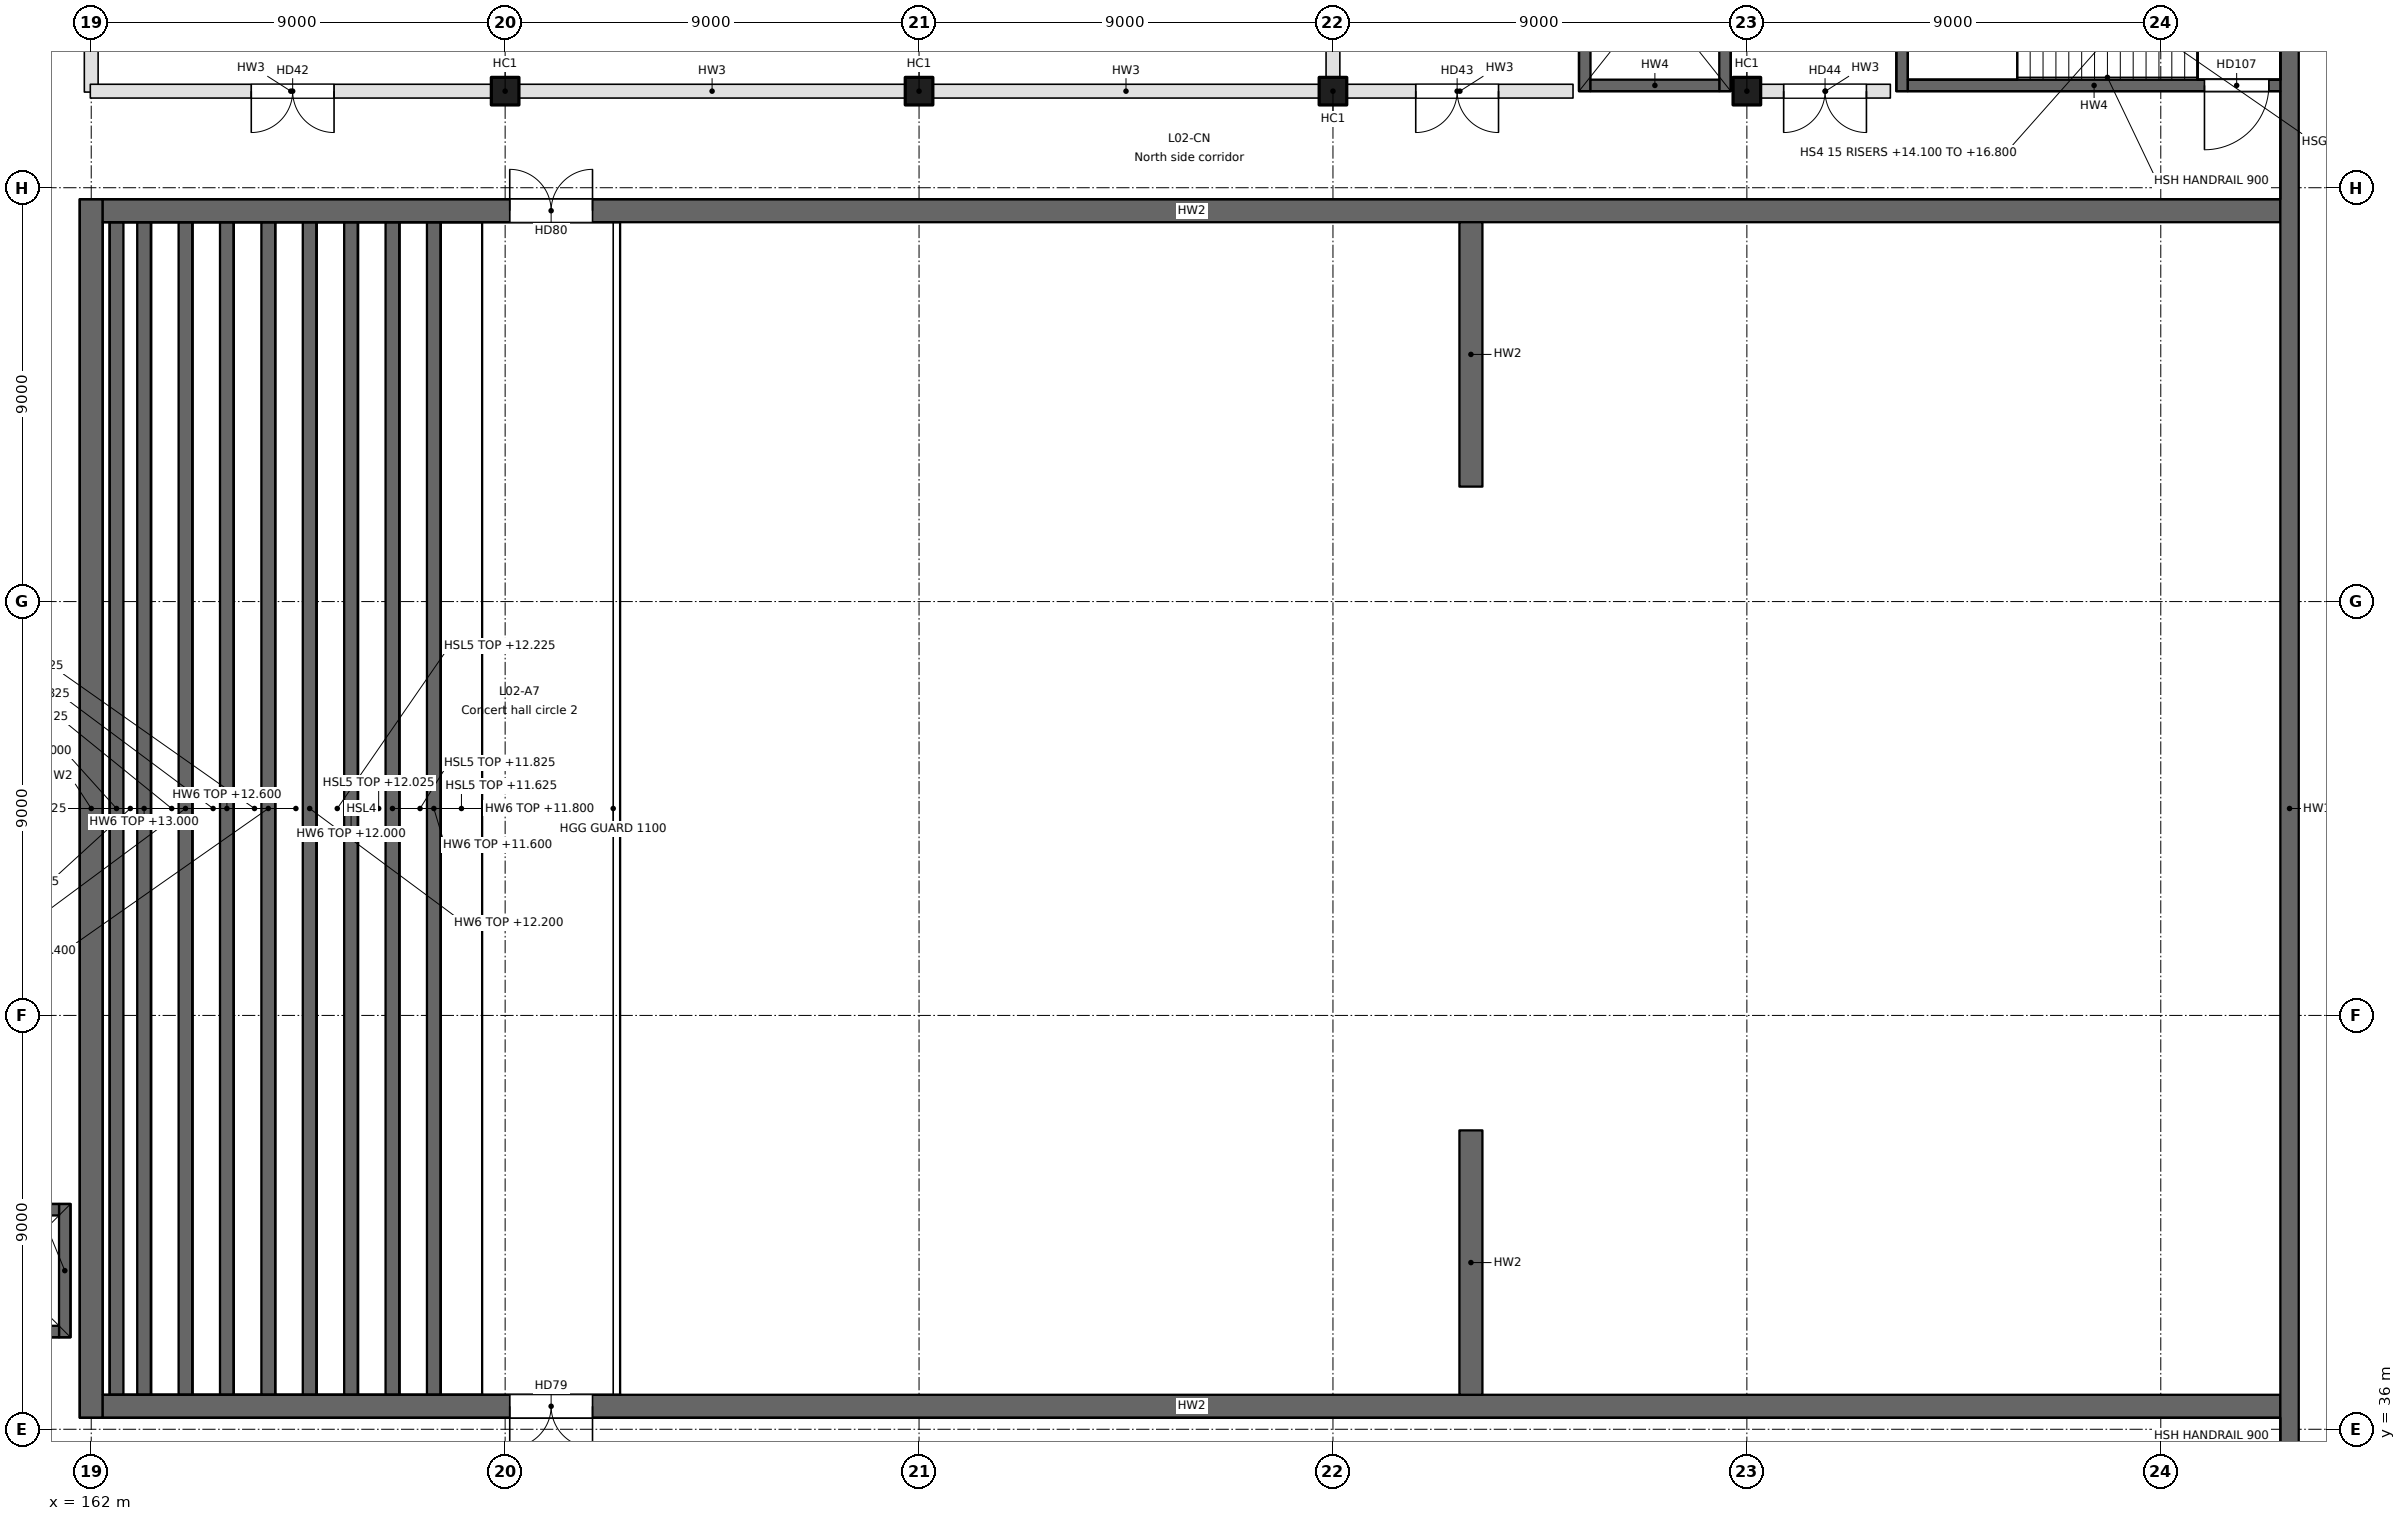
"""IFC4 building model, lengths in metres.
Left out: names, types, materials, properties, quantities, classifications, styles, units other than length and angle.
Written with IfcOpenShell. Run it as: python <this file> out.ifc"""

import sys

from ifc_helpers import new_model, si_unit, direction, frame, frame_2d, origin, origin_2d, place, context, subcontext, project, spatial, rectangle, extrude, element, fill, save


model = new_model("IFC4")
c1 = context("Model", 3, precision=1e-05, world=origin(), true_north=direction((0.0, 1.0)))
c2 = subcontext(c1, "Body", "Model", "MODEL_VIEW")
j1 = project(units=[si_unit("LENGTHUNIT", "METRE"), si_unit("PLANEANGLEUNIT", "RADIAN")], contexts=[c1])
p1 = place(None, origin())
s1 = spatial("IfcSite", under=j1, at=p1, CompositionType="ELEMENT")
p2 = place(p1, origin())
s2 = spatial("IfcBuilding", under=s1, at=p2, CompositionType="ELEMENT")
p3 = place(p2, frame((0.0, 0.0, 11.4)))
s3 = spatial("IfcBuildingStorey", under=s2, at=p3, CompositionType="ELEMENT", Elevation=11.4)
for number, where, z_axis, x_axis in (
    (1, (171.0, 65.1, 0.0), (0.0, 0.0, 1.0), (1.0, 0.0, 0.0)),
    (2, (180.0, 65.1, 0.0), (0.0, 0.0, 1.0), (1.0, 0.0, 0.0)),
    (3, (189.0, 65.1, 0.0), (0.0, 0.0, 1.0), (1.0, 0.0, 0.0)),
    (4, (198.0, 65.1, 0.0), (0.0, 0.0, 1.0), (1.0, 0.0, 0.0)),
):
    element("IfcColumn", number, at=place(p3, frame(where, z_axis=z_axis, x_axis=x_axis)), inside=s3, PredefinedType="COLUMN", context=c2, shape_type="SweptSolid", body=[
        extrude(rectangle(XDim=0.6, YDim=0.6, at=origin_2d()), origin(), (0.0, 0.0, 1.0), 5.4),
    ])
p4 = place(p3, frame((162.0, 36.25, -0.35), z_axis=(0.0, 0.0, 1.0), x_axis=(0.0, 1.0, 0.0)))
e5 = element("IfcWall", 5, at=p4, inside=s3, PredefinedType="SOLIDWALL", context=c2, shape_type="SweptSolid", body=[
    extrude(rectangle(XDim=26.5, YDim=0.5, at=frame_2d((13.25, 0.0))), origin(), (0.0, 0.0, 1.0), 5.4),
])
p5 = place(p3, frame((209.6, 36.5, -0.35), z_axis=(0.0, 0.0, 1.0), x_axis=(-1.0, 0.0, 0.0)))
e6 = element("IfcWall", 6, at=p5, inside=s3, PredefinedType="SOLIDWALL", context=c2, shape_type="SweptSolid", body=[
    extrude(rectangle(XDim=47.35, YDim=0.5, at=frame_2d((23.675, 0.0))), origin(), (0.0, 0.0, 1.0), 5.4),
])
p6 = place(p5, frame((36.7, 0.0, 0.35)))
e7 = element("IfcOpeningElement", 7, at=p6, cuts=e6, PredefinedType="OPENING", context=c2, shape_type="SweptSolid", body=[
    extrude(rectangle(XDim=1.8, YDim=2.4, at=frame_2d((0.9, 1.2))), frame((0.0, 0.25, 0.0), z_axis=(0.0, -1.0, 0.0), x_axis=(1.0, 0.0, 0.0)), (0.0, 0.0, 1.0), 0.5),
])
p7 = place(p3, frame((162.25, 62.5, -0.35), z_axis=(0.0, 0.0, 1.0), x_axis=(1.0, 0.0, 0.0)))
e8 = element("IfcWall", 8, at=p7, inside=s3, PredefinedType="SOLIDWALL", context=c2, shape_type="SweptSolid", body=[
    extrude(rectangle(XDim=47.35, YDim=0.5, at=frame_2d((23.675, 0.0))), origin(), (0.0, 0.0, 1.0), 5.4),
])
p8 = place(p7, frame((8.85, 0.0, 0.35)))
e9 = element("IfcOpeningElement", 9, at=p8, cuts=e8, PredefinedType="OPENING", context=c2, shape_type="SweptSolid", body=[
    extrude(rectangle(XDim=1.8, YDim=2.4, at=frame_2d((0.9, 1.2))), frame((0.0, 0.25, 0.0), z_axis=(0.0, -1.0, 0.0), x_axis=(1.0, 0.0, 0.0)), (0.0, 0.0, 1.0), 0.5),
])
for number, where, z_axis, x_axis in (
    (10, (192.0, 36.75, -0.35), (0.0, 0.0, 1.0), (0.0, 1.0, 0.0)),
    (11, (192.0, 56.5, -0.35), (0.0, 0.0, 1.0), (0.0, 1.0, 0.0)),
):
    element("IfcWall", number, at=place(p3, frame(where, z_axis=z_axis, x_axis=x_axis)), inside=s3, PredefinedType="SOLIDWALL", context=c2, shape_type="SweptSolid", body=[
        extrude(rectangle(XDim=5.75, YDim=0.5, at=frame_2d((2.875, 0.0))), origin(), (0.0, 0.0, 1.0), 5.4),
    ])
p9 = place(p3, frame((209.8, 76.5, -0.35), z_axis=(0.0, 0.0, 1.0), x_axis=(0.0, -1.0, 0.0)))
e12 = element("IfcWall", 12, at=p9, inside=s3, PredefinedType="SOLIDWALL", context=c2, shape_type="SweptSolid", body=[
    extrude(rectangle(XDim=54.0, YDim=0.4, at=frame_2d((27.0, 0.0))), origin(), (0.0, 0.0, 1.0), 5.4),
])
p10 = place(p9, frame((49.3, 0.0, 1.25)))
e13 = element("IfcOpeningElement", 13, at=p10, cuts=e12, PredefinedType="OPENING", context=c2, shape_type="SweptSolid", body=[
    extrude(rectangle(XDim=2.4, YDim=1.8, at=frame_2d((1.2, 0.9))), frame((0.0, 0.2, 0.0), z_axis=(0.0, -1.0, 0.0), x_axis=(1.0, 0.0, 0.0)), (0.0, 0.0, 1.0), 0.4),
])
p11 = place(p9, frame((2.3, 0.0, 1.25)))
e14 = element("IfcOpeningElement", 14, at=p11, cuts=e12, PredefinedType="OPENING", context=c2, shape_type="SweptSolid", body=[
    extrude(rectangle(XDim=2.4, YDim=1.8, at=frame_2d((1.2, 0.9))), frame((0.0, 0.2, 0.0), z_axis=(0.0, -1.0, 0.0), x_axis=(1.0, 0.0, 0.0)), (0.0, 0.0, 1.0), 0.4),
])
p12 = place(p3, frame((169.45, 36.75, 0.0), z_axis=(0.0, 0.0, 1.0), x_axis=(0.0, 1.0, 0.0)))
e15 = element("IfcWall", 15, at=p12, inside=s3, PredefinedType="SOLIDWALL", context=c2, shape_type="SweptSolid", body=[
    extrude(rectangle(XDim=25.5, YDim=0.3, at=frame_2d((12.75, 0.0))), origin(), (0.0, 0.0, 1.0), 0.2),
])
p13 = place(p3, frame((168.55, 36.75, 0.0), z_axis=(0.0, 0.0, 1.0), x_axis=(0.0, 1.0, 0.0)))
e16 = element("IfcWall", 16, at=p13, inside=s3, PredefinedType="SOLIDWALL", context=c2, shape_type="SweptSolid", body=[
    extrude(rectangle(XDim=25.5, YDim=0.3, at=frame_2d((12.75, 0.0))), origin(), (0.0, 0.0, 1.0), 0.4),
])
p14 = place(p3, frame((167.65, 36.75, 0.0), z_axis=(0.0, 0.0, 1.0), x_axis=(0.0, 1.0, 0.0)))
e17 = element("IfcWall", 17, at=p14, inside=s3, PredefinedType="SOLIDWALL", context=c2, shape_type="SweptSolid", body=[
    extrude(rectangle(XDim=25.5, YDim=0.3, at=frame_2d((12.75, 0.0))), origin(), (0.0, 0.0, 1.0), 0.6),
])
p15 = place(p3, frame((166.75, 36.75, 0.0), z_axis=(0.0, 0.0, 1.0), x_axis=(0.0, 1.0, 0.0)))
e18 = element("IfcWall", 18, at=p15, inside=s3, PredefinedType="SOLIDWALL", context=c2, shape_type="SweptSolid", body=[
    extrude(rectangle(XDim=25.5, YDim=0.3, at=frame_2d((12.75, 0.0))), origin(), (0.0, 0.0, 1.0), 0.8),
])
p16 = place(p3, frame((165.85, 36.75, 0.0), z_axis=(0.0, 0.0, 1.0), x_axis=(0.0, 1.0, 0.0)))
e19 = element("IfcWall", 19, at=p16, inside=s3, PredefinedType="SOLIDWALL", context=c2, shape_type="SweptSolid", body=[
    extrude(rectangle(XDim=25.5, YDim=0.3, at=frame_2d((12.75, 0.0))), origin(), (0.0, 0.0, 1.0), 1.0),
])
p17 = place(p3, frame((164.95, 36.75, 0.0), z_axis=(0.0, 0.0, 1.0), x_axis=(0.0, 1.0, 0.0)))
e20 = element("IfcWall", 20, at=p17, inside=s3, PredefinedType="SOLIDWALL", context=c2, shape_type="SweptSolid", body=[
    extrude(rectangle(XDim=25.5, YDim=0.3, at=frame_2d((12.75, 0.0))), origin(), (0.0, 0.0, 1.0), 1.2),
])
p18 = place(p3, frame((164.05, 36.75, 0.0), z_axis=(0.0, 0.0, 1.0), x_axis=(0.0, 1.0, 0.0)))
e21 = element("IfcWall", 21, at=p18, inside=s3, PredefinedType="SOLIDWALL", context=c2, shape_type="SweptSolid", body=[
    extrude(rectangle(XDim=25.5, YDim=0.3, at=frame_2d((12.75, 0.0))), origin(), (0.0, 0.0, 1.0), 1.4),
])
for number, where, z_axis, x_axis in (
    (22, (163.15, 36.75, 0.0), (0.0, 0.0, 1.0), (0.0, 1.0, 0.0)),
    (23, (162.55, 36.75, 0.0), (0.0, 0.0, 1.0), (0.0, 1.0, 0.0)),
):
    element("IfcWall", number, at=place(p3, frame(where, z_axis=z_axis, x_axis=x_axis)), inside=s3, PredefinedType="SOLIDWALL", context=c2, shape_type="SweptSolid", body=[
        extrude(rectangle(XDim=25.5, YDim=0.3, at=frame_2d((12.75, 0.0))), origin(), (0.0, 0.0, 1.0), 1.6),
    ])
p19 = place(p3, frame((162.0, 65.08, 0.0), z_axis=(0.0, 0.0, 1.0), x_axis=(0.0, 1.0, 0.0)))
e24 = element("IfcWall", 24, at=p19, inside=s3, PredefinedType="PARTITIONING", context=c2, shape_type="SweptSolid", body=[
    extrude(rectangle(XDim=11.19, YDim=0.3, at=frame_2d((5.595, 0.0))), origin(), (0.0, 0.0, 1.0), 5.05),
])
p20 = place(p19, frame((4.75, 0.0, 0.0)))
e25 = element("IfcOpeningElement", 25, at=p20, cuts=e24, PredefinedType="OPENING", context=c2, shape_type="SweptSolid", body=[
    extrude(rectangle(XDim=1.8, YDim=2.1, at=frame_2d((0.9, 1.05))), frame((0.0, 0.15, 0.0), z_axis=(0.0, -1.0, 0.0), x_axis=(1.0, 0.0, 0.0)), (0.0, 0.0, 1.0), 0.3),
])
p21 = place(p3, frame((189.0, 65.4, 0.0), z_axis=(0.0, 0.0, 1.0), x_axis=(0.0, 1.0, 0.0)))
e26 = element("IfcWall", 26, at=p21, inside=s3, PredefinedType="PARTITIONING", context=c2, shape_type="SweptSolid", body=[
    extrude(rectangle(XDim=10.87, YDim=0.3, at=frame_2d((5.435, 0.0))), origin(), (0.0, 0.0, 1.0), 5.05),
])
p22 = place(p3, frame((170.7, 65.1, 0.0), z_axis=(0.0, 0.0, 1.0), x_axis=(-1.0, 0.0, 0.0)))
e27 = element("IfcWall", 27, at=p22, inside=s3, PredefinedType="PARTITIONING", context=c2, shape_type="SweptSolid", body=[
    extrude(rectangle(XDim=8.72, YDim=0.3, at=frame_2d((4.36, 0.0))), origin(), (0.0, 0.0, 1.0), 5.05),
])
p23 = place(p22, frame((3.42, 0.0, 0.0)))
e28 = element("IfcOpeningElement", 28, at=p23, cuts=e27, PredefinedType="OPENING", context=c2, shape_type="SweptSolid", body=[
    extrude(rectangle(XDim=1.8, YDim=2.1, at=frame_2d((0.9, 1.05))), frame((0.0, 0.15, 0.0), z_axis=(0.0, -1.0, 0.0), x_axis=(1.0, 0.0, 0.0)), (0.0, 0.0, 1.0), 0.3),
])
for number, where, z_axis, x_axis in (
    (29, (179.7, 65.1, 0.0), (0.0, 0.0, 1.0), (-1.0, 0.0, 0.0)),
    (30, (188.7, 65.1, 0.0), (0.0, 0.0, 1.0), (-1.0, 0.0, 0.0)),
):
    element("IfcWall", number, at=place(p3, frame(where, z_axis=z_axis, x_axis=x_axis)), inside=s3, PredefinedType="PARTITIONING", context=c2, shape_type="SweptSolid", body=[
        extrude(rectangle(XDim=8.4, YDim=0.3, at=frame_2d((4.2, 0.0))), origin(), (0.0, 0.0, 1.0), 5.05),
    ])
p24 = place(p3, frame((194.22, 65.1, 0.0), z_axis=(0.0, 0.0, 1.0), x_axis=(-1.0, 0.0, 0.0)))
e31 = element("IfcWall", 31, at=p24, inside=s3, PredefinedType="PARTITIONING", context=c2, shape_type="SweptSolid", body=[
    extrude(rectangle(XDim=4.92, YDim=0.3, at=frame_2d((2.46, 0.0))), origin(), (0.0, 0.0, 1.0), 5.05),
])
p25 = place(p24, frame((1.62, 0.0, 0.0)))
e32 = element("IfcOpeningElement", 32, at=p25, cuts=e31, PredefinedType="OPENING", context=c2, shape_type="SweptSolid", body=[
    extrude(rectangle(XDim=1.8, YDim=2.1, at=frame_2d((0.9, 1.05))), frame((0.0, 0.15, 0.0), z_axis=(0.0, -1.0, 0.0), x_axis=(1.0, 0.0, 0.0)), (0.0, 0.0, 1.0), 0.3),
])
p26 = place(p3, frame((201.12, 65.1, 0.0), z_axis=(0.0, 0.0, 1.0), x_axis=(-1.0, 0.0, 0.0)))
e33 = element("IfcWall", 33, at=p26, inside=s3, PredefinedType="PARTITIONING", context=c2, shape_type="SweptSolid", body=[
    extrude(rectangle(XDim=2.82, YDim=0.3, at=frame_2d((1.41, 0.0))), origin(), (0.0, 0.0, 1.0), 5.05),
])
p27 = place(p26, frame((0.52, 0.0, 0.0)))
e34 = element("IfcOpeningElement", 34, at=p27, cuts=e33, PredefinedType="OPENING", context=c2, shape_type="SweptSolid", body=[
    extrude(rectangle(XDim=1.8, YDim=2.1, at=frame_2d((0.9, 1.05))), frame((0.0, 0.15, 0.0), z_axis=(0.0, -1.0, 0.0), x_axis=(1.0, 0.0, 0.0)), (0.0, 0.0, 1.0), 0.3),
])
p28 = place(p3, frame((201.375, 65.1, -0.35), z_axis=(0.0, 0.0, 1.0), x_axis=(0.0, 1.0, 0.0)))
e35 = element("IfcWall", 35, at=p28, inside=s3, PredefinedType="SOLIDWALL", context=c2, shape_type="SweptSolid", body=[
    extrude(rectangle(XDim=4.25, YDim=0.25, at=frame_2d((2.125, 0.0))), origin(), (0.0, 0.0, 1.0), 5.4),
])
p29 = place(p3, frame((209.6, 65.225, -0.35), z_axis=(0.0, 0.0, 1.0), x_axis=(-1.0, 0.0, 0.0)))
e36 = element("IfcWall", 36, at=p29, inside=s3, PredefinedType="SOLIDWALL", context=c2, shape_type="SweptSolid", body=[
    extrude(rectangle(XDim=8.1, YDim=0.25, at=frame_2d((4.05, 0.0))), origin(), (0.0, 0.0, 1.0), 5.4),
])
p30 = place(p29, frame((0.25, 0.0, 0.35)))
e37 = element("IfcOpeningElement", 37, at=p30, cuts=e36, PredefinedType="OPENING", context=c2, shape_type="SweptSolid", body=[
    extrude(rectangle(XDim=1.4, YDim=2.1, at=frame_2d((0.7, 1.05))), frame((0.0, 0.125, 0.0), z_axis=(0.0, -1.0, 0.0), x_axis=(1.0, 0.0, 0.0)), (0.0, 0.0, 1.0), 0.25),
])
p31 = place(p3, frame((161.425, 40.9, -0.35), z_axis=(0.0, 0.0, 1.0), x_axis=(0.0, -1.0, 0.0)))
e38 = element("IfcWall", 38, at=p31, inside=s3, PredefinedType="SOLIDWALL", context=c2, shape_type="SweptSolid", body=[
    extrude(rectangle(XDim=2.9, YDim=0.25, at=frame_2d((1.45, 0.0))), origin(), (0.0, 0.0, 1.0), 5.4),
])
for number, where, z_axis, x_axis in (
    (39, (161.3, 38.125, -0.35), (0.0, 0.0, 1.0), (-1.0, 0.0, 0.0)),
    (40, (158.9, 40.775, -0.35), (0.0, 0.0, 1.0), (1.0, 0.0, 0.0)),
):
    element("IfcWall", number, at=place(p3, frame(where, z_axis=z_axis, x_axis=x_axis)), inside=s3, PredefinedType="SOLIDWALL", context=c2, shape_type="SweptSolid", body=[
        extrude(rectangle(XDim=2.4, YDim=0.25, at=frame_2d((1.2, 0.0))), origin(), (0.0, 0.0, 1.0), 5.4),
    ])
p32 = place(p3, frame((194.475, 65.1, -0.35), z_axis=(0.0, 0.0, 1.0), x_axis=(0.0, 1.0, 0.0)))
e41 = element("IfcWall", 41, at=p32, inside=s3, PredefinedType="SOLIDWALL", context=c2, shape_type="SweptSolid", body=[
    extrude(rectangle(XDim=4.15, YDim=0.25, at=frame_2d((2.075, 0.0))), origin(), (0.0, 0.0, 1.0), 5.4),
])
p33 = place(p32, frame((1.175, 0.0, 0.35)))
e42 = element("IfcOpeningElement", 42, at=p33, cuts=e41, PredefinedType="OPENING", context=c2, shape_type="SweptSolid", body=[
    extrude(rectangle(XDim=1.8, YDim=2.4, at=frame_2d((0.9, 1.2))), frame((0.0, 0.125, 0.0), z_axis=(0.0, -1.0, 0.0), x_axis=(1.0, 0.0, 0.0)), (0.0, 0.0, 1.0), 0.25),
])
p34 = place(p3, frame((197.525, 69.25, -0.35), z_axis=(0.0, 0.0, 1.0), x_axis=(0.0, -1.0, 0.0)))
e43 = element("IfcWall", 43, at=p34, inside=s3, PredefinedType="SOLIDWALL", context=c2, shape_type="SweptSolid", body=[
    extrude(rectangle(XDim=4.15, YDim=0.25, at=frame_2d((2.075, 0.0))), origin(), (0.0, 0.0, 1.0), 5.4),
])
p35 = place(p3, frame((197.4, 65.225, -0.35), z_axis=(0.0, 0.0, 1.0), x_axis=(-1.0, 0.0, 0.0)))
e44 = element("IfcWall", 44, at=p35, inside=s3, PredefinedType="SOLIDWALL", context=c2, shape_type="SweptSolid", body=[
    extrude(rectangle(XDim=2.8, YDim=0.25, at=frame_2d((1.4, 0.0))), origin(), (0.0, 0.0, 1.0), 5.4),
])
p36 = place(p23, origin())
e45 = element("IfcDoor", 45, at=p36, inside=s3, OperationType="DOUBLE_DOOR_SINGLE_SWING", PredefinedType="DOOR", context=c2, shape_type="SweptSolid", body=[
    extrude(rectangle(XDim=1.8, YDim=2.1, at=frame_2d((0.9, 1.05))), frame((0.0, 0.025, 0.0), z_axis=(0.0, -1.0, 0.0), x_axis=(1.0, 0.0, 0.0)), (0.0, 0.0, 1.0), 0.05),
])
fill(e28, e45)
p37 = place(p25, origin())
e46 = element("IfcDoor", 46, at=p37, inside=s3, OperationType="DOUBLE_DOOR_SINGLE_SWING", PredefinedType="DOOR", context=c2, shape_type="SweptSolid", body=[
    extrude(rectangle(XDim=1.8, YDim=2.1, at=frame_2d((0.9, 1.05))), frame((0.0, 0.025, 0.0), z_axis=(0.0, -1.0, 0.0), x_axis=(1.0, 0.0, 0.0)), (0.0, 0.0, 1.0), 0.05),
])
fill(e32, e46)
p38 = place(p27, origin())
e47 = element("IfcDoor", 47, at=p38, inside=s3, OperationType="DOUBLE_DOOR_SINGLE_SWING", PredefinedType="DOOR", context=c2, shape_type="SweptSolid", body=[
    extrude(rectangle(XDim=1.8, YDim=2.1, at=frame_2d((0.9, 1.05))), frame((0.0, 0.025, 0.0), z_axis=(0.0, -1.0, 0.0), x_axis=(1.0, 0.0, 0.0)), (0.0, 0.0, 1.0), 0.05),
])
fill(e34, e47)
p39 = place(p6, origin())
e48 = element("IfcDoor", 48, at=p39, inside=s3, OperationType="DOUBLE_DOOR_SINGLE_SWING", PredefinedType="DOOR", context=c2, shape_type="SweptSolid", body=[
    extrude(rectangle(XDim=1.8, YDim=2.4, at=frame_2d((0.9, 1.2))), frame((0.0, 0.025, 0.0), z_axis=(0.0, -1.0, 0.0), x_axis=(1.0, 0.0, 0.0)), (0.0, 0.0, 1.0), 0.05),
])
fill(e7, e48)
p40 = place(p8, origin())
e49 = element("IfcDoor", 49, at=p40, inside=s3, OperationType="DOUBLE_DOOR_SINGLE_SWING", PredefinedType="DOOR", context=c2, shape_type="SweptSolid", body=[
    extrude(rectangle(XDim=1.8, YDim=2.4, at=frame_2d((0.9, 1.2))), frame((0.0, 0.025, 0.0), z_axis=(0.0, -1.0, 0.0), x_axis=(1.0, 0.0, 0.0)), (0.0, 0.0, 1.0), 0.05),
])
fill(e9, e49)
p41 = place(p30, origin())
e50 = element("IfcDoor", 50, at=p41, inside=s3, OperationType="SINGLE_SWING_RIGHT", PredefinedType="DOOR", context=c2, shape_type="SweptSolid", body=[
    extrude(rectangle(XDim=1.4, YDim=2.1, at=frame_2d((0.7, 1.05))), frame((0.0, 0.025, 0.0), z_axis=(0.0, -1.0, 0.0), x_axis=(1.0, 0.0, 0.0)), (0.0, 0.0, 1.0), 0.05),
])
fill(e37, e50)
save(model, sys.argv[1])
